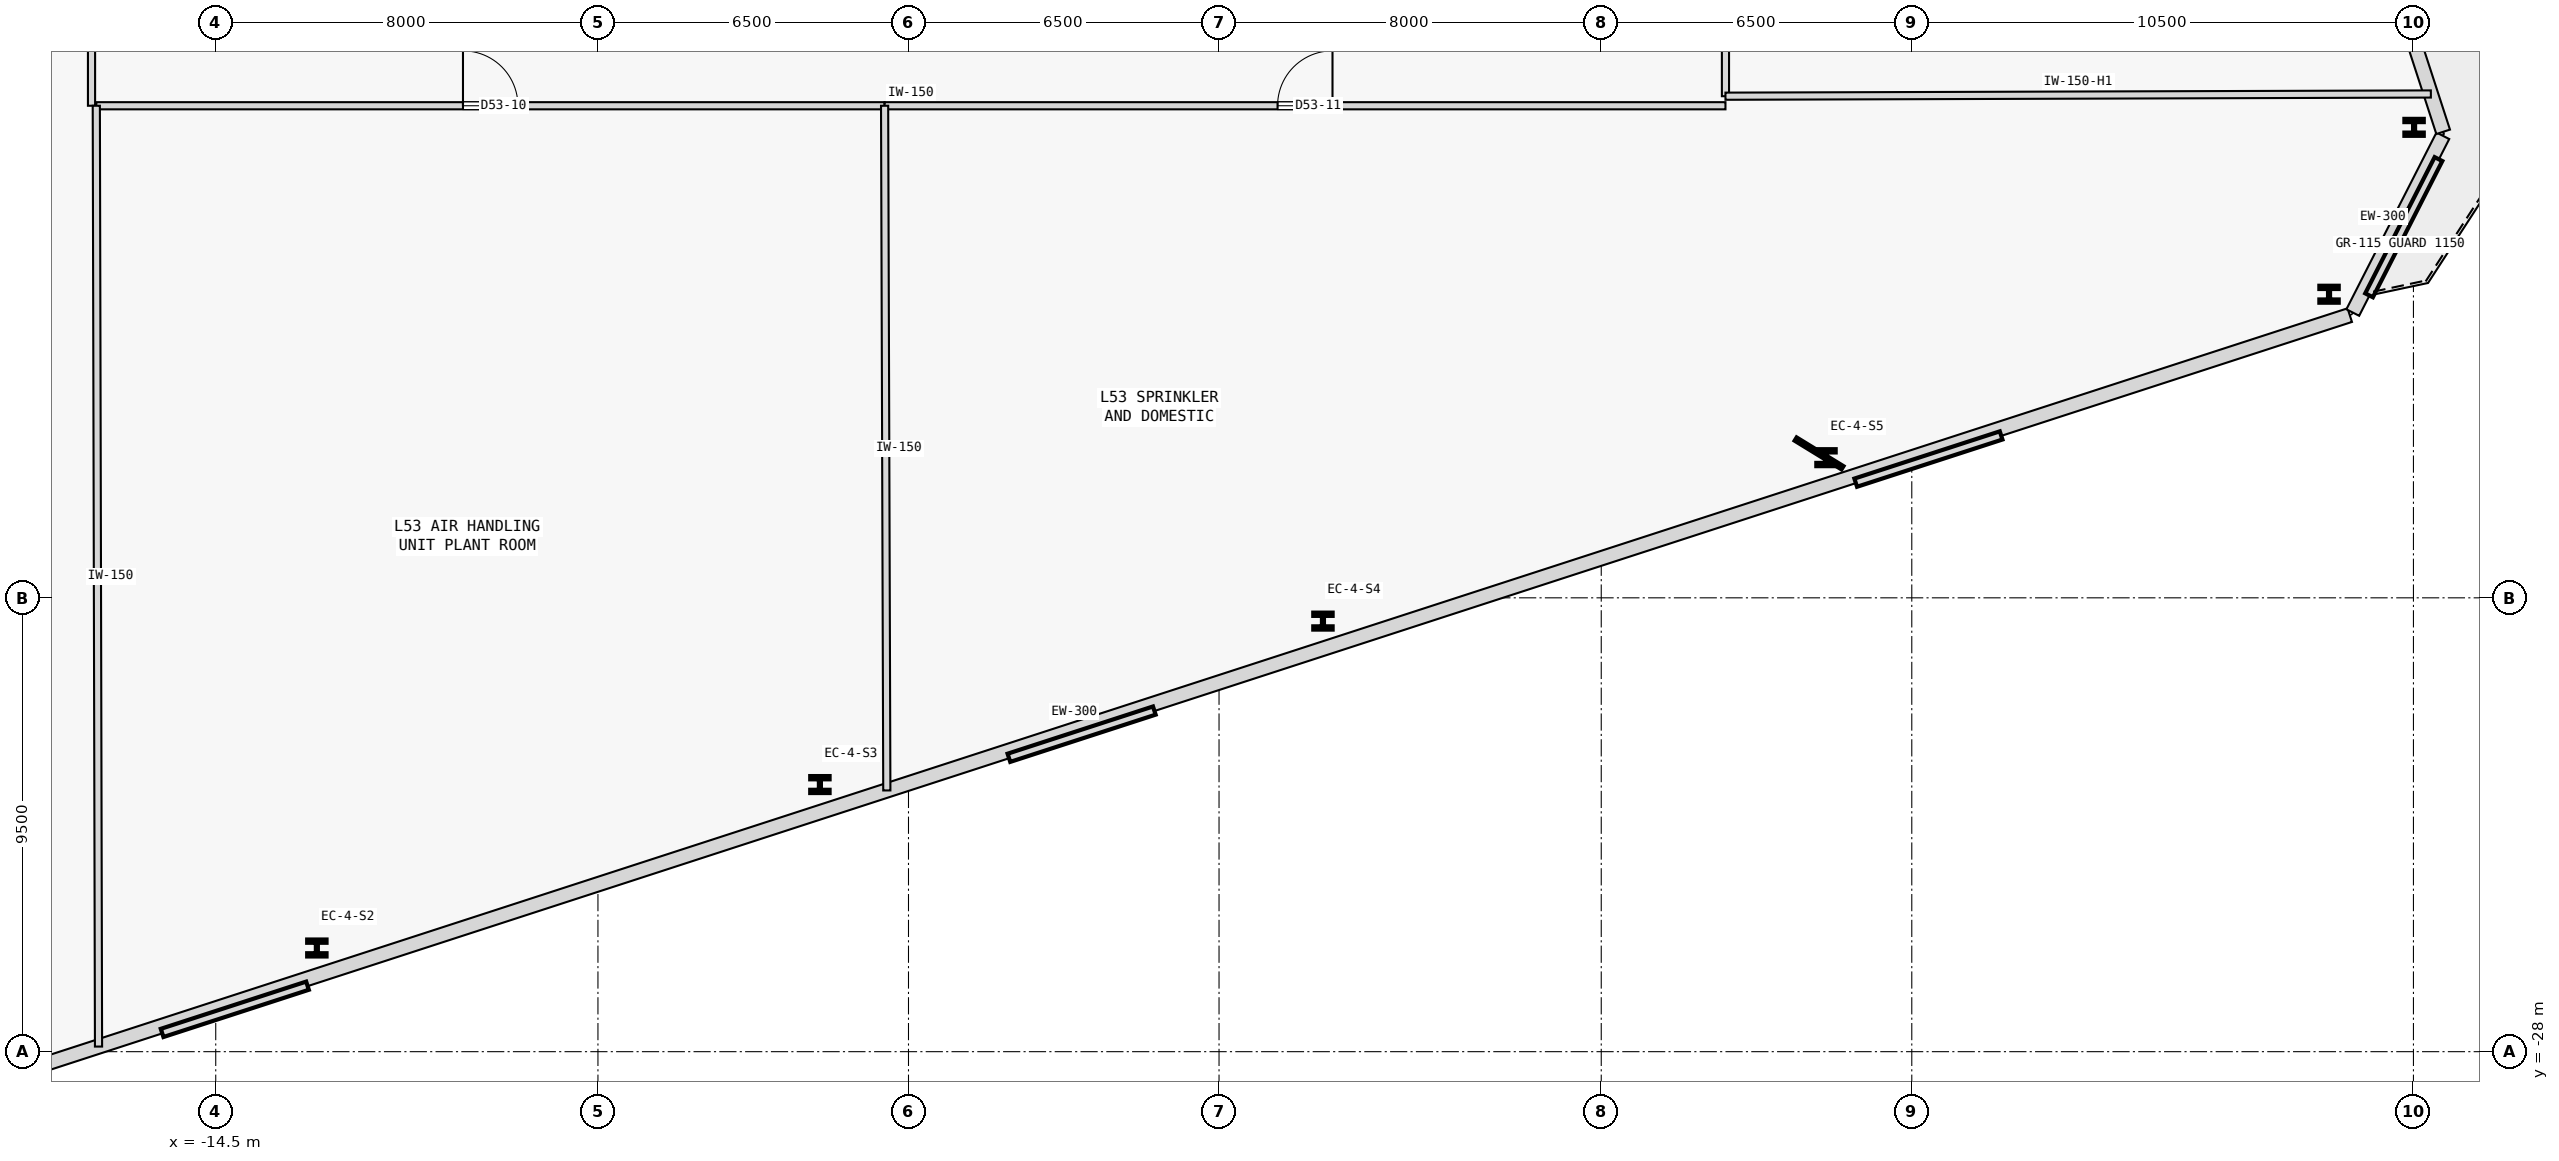
"""IFC4 building model, lengths in metres.
Left out: names, types, materials, properties, quantities, classifications, styles, units other than length and angle.
Written with IfcOpenShell. Run it as: python <this file> out.ifc"""

import sys

from ifc_helpers import new_model, si_unit, direction, frame, frame_2d, origin, origin_2d, place, context, subcontext, project, spatial, rectangle, i_section, extrude, element, fill, save


model = new_model("IFC4")
c1 = context("Model", 3, precision=1e-05, world=origin(), true_north=direction((0.0, 1.0)))
c2 = subcontext(c1, "Body", "Model", "MODEL_VIEW")
j1 = project(units=[si_unit("LENGTHUNIT", "METRE"), si_unit("PLANEANGLEUNIT", "RADIAN")], contexts=[c1])
p1 = place(None, origin())
s1 = spatial("IfcSite", under=j1, at=p1, CompositionType="ELEMENT")
p2 = place(p1, origin())
s2 = spatial("IfcBuilding", under=s1, at=p2, CompositionType="ELEMENT")
p3 = place(p2, frame((0.0, 0.0, 202.4)))
s3 = spatial("IfcBuildingStorey", under=s2, at=p3, CompositionType="ELEMENT", Elevation=202.4)
for number, where, z_axis, x_axis in (
    (1, (-12.384, -25.83, 0.0), (0.0, 0.0, 1.0), (1.0, 0.0, 0.0)),
    (2, (-1.854, -22.409, 0.0), (0.0, 0.0, 1.0), (1.0, 0.0, 0.0)),
    (3, (8.675, -18.988, 0.0), (0.0, 0.0, 1.0), (1.0, 0.0, 0.0)),
    (4, (19.204, -15.566, 0.0), (0.0, 0.0, 1.0), (1.0, 0.0, 0.0)),
    (5, (29.734, -12.145, 0.0), (0.0, 0.0, 1.0), (1.0, 0.0, 0.0)),
    (6, (31.513, -8.652, 0.0), (0.0, 0.0, 1.0), (1.0, 0.0, 0.0)),
):
    element("IfcColumn", number, at=place(p3, frame(where, z_axis=z_axis, x_axis=x_axis)), inside=s3, PredefinedType="COLUMN", context=c2, shape_type="SweptSolid", body=[
        extrude(i_section(OverallWidth=0.405, OverallDepth=0.355, WebThickness=0.042, FlangeThickness=0.068, FilletRadius=0.015, at=origin_2d()), origin(), (0.0, 0.0, 1.0), 4.4),
    ])
p4 = place(p3, frame((-23.006, -29.86, 0.0), z_axis=(0.0, 0.0, 1.0), x_axis=(0.951056336628, 0.309017547334, 0.0)))
e7 = element("IfcWall", 7, at=p4, inside=s3, PredefinedType="STANDARD", context=c2, shape_type="SweptSolid", body=[
    extrude(rectangle(XDim=55.91, YDim=0.3, at=frame_2d((27.955, 0.0))), origin(), (0.0, 0.0, 1.0), 4.15),
])
p5 = place(p3, frame((30.23, -12.529, 0.0), z_axis=(0.0, 0.0, 1.0), x_axis=(0.453950442261, 0.891026933359, 0.0)))
e8 = element("IfcWall", 8, at=p5, inside=s3, PredefinedType="STANDARD", context=c2, shape_type="SweptSolid", body=[
    extrude(rectangle(XDim=4.152, YDim=0.3, at=frame_2d((2.076, 0.0))), origin(), (0.0, 0.0, 1.0), 4.15),
])
p6 = place(p3, frame((32.122, -8.746, 0.0), z_axis=(0.0, 0.0, 1.0), x_axis=(-0.309017534148, 0.951056340912, 0.0)))
e9 = element("IfcWall", 9, at=p6, inside=s3, PredefinedType="STANDARD", context=c2, shape_type="SweptSolid", body=[
    extrude(rectangle(XDim=33.91, YDim=0.3, at=frame_2d((16.955, 0.0))), origin(), (0.0, 0.0, 1.0), 4.15),
])
p7 = place(p3, frame((-17.0, -8.2, 0.0), z_axis=(0.0, 0.0, 1.0), x_axis=(1.0, 0.0, 0.0)))
e10 = element("IfcWall", 10, at=p7, inside=s3, PredefinedType="PARTITIONING", context=c2, shape_type="SweptSolid", body=[
    extrude(rectangle(XDim=16.5, YDim=0.15, at=frame_2d((8.25, 0.0))), origin(), (0.0, 0.0, 1.0), 4.15),
])
p8 = place(p7, frame((7.675, 0.0, 0.0)))
e11 = element("IfcOpeningElement", 11, at=p8, cuts=e10, PredefinedType="OPENING", context=c2, shape_type="SweptSolid", body=[
    extrude(rectangle(XDim=1.15, YDim=2.15, at=frame_2d((0.575, 1.075))), frame((0.0, 0.085, 0.0), z_axis=(0.0, -1.0, 0.0), x_axis=(1.0, 0.0, 0.0)), (0.0, 0.0, 1.0), 0.17),
])
p9 = place(p3, frame((-0.5, -8.2, 0.0), z_axis=(0.0, 0.0, 1.0), x_axis=(1.0, 0.0, 0.0)))
e12 = element("IfcWall", 12, at=p9, inside=s3, PredefinedType="PARTITIONING", context=c2, shape_type="SweptSolid", body=[
    extrude(rectangle(XDim=17.6, YDim=0.15, at=frame_2d((8.8, 0.0))), origin(), (0.0, 0.0, 1.0), 4.15),
])
p10 = place(p9, frame((8.225, 0.0, 0.0)))
e13 = element("IfcOpeningElement", 13, at=p10, cuts=e12, PredefinedType="OPENING", context=c2, shape_type="SweptSolid", body=[
    extrude(rectangle(XDim=1.15, YDim=2.15, at=frame_2d((0.575, 1.075))), frame((0.0, 0.085, 0.0), z_axis=(0.0, -1.0, 0.0), x_axis=(1.0, 0.0, 0.0)), (0.0, 0.0, 1.0), 0.17),
])
p11 = place(p3, frame((-17.1, -8.2, 0.0), z_axis=(0.0, 0.0, 1.0), x_axis=(0.0, 1.0, 0.0)))
e14 = element("IfcWall", 14, at=p11, inside=s3, PredefinedType="PARTITIONING", context=c2, shape_type="SweptSolid", body=[
    extrude(rectangle(XDim=16.4, YDim=0.15, at=frame_2d((8.2, 0.0))), origin(), (0.0, 0.0, 1.0), 4.15),
])
p12 = place(p11, frame((5.165, 0.0, 0.0)))
e15 = element("IfcOpeningElement", 15, at=p12, cuts=e14, PredefinedType="OPENING", context=c2, shape_type="SweptSolid", body=[
    extrude(rectangle(XDim=1.15, YDim=2.15, at=frame_2d((0.575, 1.075))), frame((0.0, 0.085, 0.0), z_axis=(0.0, -1.0, 0.0), x_axis=(1.0, 0.0, 0.0)), (0.0, 0.0, 1.0), 0.17),
])
p13 = place(p3, frame((17.1, -8.0, 0.0), z_axis=(0.0, 0.0, 1.0), x_axis=(0.0, 1.0, 0.0)))
e16 = element("IfcWall", 16, at=p13, inside=s3, PredefinedType="PARTITIONING", context=c2, shape_type="SweptSolid", body=[
    extrude(rectangle(XDim=16.0, YDim=0.15, at=frame_2d((8.0, 0.0))), origin(), (0.0, 0.0, 1.0), 4.15),
])
p14 = place(p13, frame((5.025, 0.0, 0.0)))
e17 = element("IfcOpeningElement", 17, at=p14, cuts=e16, PredefinedType="OPENING", context=c2, shape_type="SweptSolid", body=[
    extrude(rectangle(XDim=1.15, YDim=2.15, at=frame_2d((0.575, 1.075))), frame((0.0, 0.085, 0.0), z_axis=(0.0, -1.0, 0.0), x_axis=(1.0, 0.0, 0.0)), (0.0, 0.0, 1.0), 0.17),
])
p15 = place(p3, frame((-0.454, -22.532, 0.0), z_axis=(0.0, 0.0, 1.0), x_axis=(-0.003236614906, 0.999994762148, 0.0)))
e18 = element("IfcWall", 18, at=p15, inside=s3, PredefinedType="PARTITIONING", context=c2, shape_type="SweptSolid", body=[
    extrude(rectangle(XDim=14.332, YDim=0.15, at=frame_2d((7.166, 0.0))), origin(), (0.0, 0.0, 1.0), 4.15),
])
p16 = place(p3, frame((-16.954, -27.893, 0.0), z_axis=(0.0, 0.0, 1.0), x_axis=(-0.002355472434, 0.999997225871, 0.0)))
e19 = element("IfcWall", 19, at=p16, inside=s3, PredefinedType="PARTITIONING", context=c2, shape_type="SweptSolid", body=[
    extrude(rectangle(XDim=19.693, YDim=0.15, at=frame_2d((9.847, 0.0))), origin(), (0.0, 0.0, 1.0), 4.15),
])
p17 = place(p3, frame((17.1, -8.0, 0.0), z_axis=(0.0, 0.0, 1.0), x_axis=(0.999995064765, 0.003141726673, 0.0)))
e20 = element("IfcWall", 20, at=p17, inside=s3, PredefinedType="PARTITIONING", context=c2, shape_type="SweptSolid", body=[
    extrude(rectangle(XDim=14.765, YDim=0.15, at=frame_2d((7.382, 0.0))), origin(), (0.0, 0.0, 1.0), 3.7),
])
p18 = place(p8, origin())
e21 = element("IfcDoor", 21, at=p18, inside=s3, OperationType="SINGLE_SWING_LEFT", PredefinedType="DOOR", context=c2, shape_type="SweptSolid", body=[
    extrude(rectangle(XDim=1.15, YDim=2.15, at=frame_2d((0.575, 1.075))), frame((0.0, 0.025, 0.0), z_axis=(0.0, -1.0, 0.0), x_axis=(1.0, 0.0, 0.0)), (0.0, 0.0, 1.0), 0.05),
])
fill(e11, e21)
p19 = place(p10, origin())
e22 = element("IfcDoor", 22, at=p19, inside=s3, OperationType="SINGLE_SWING_RIGHT", PredefinedType="DOOR", context=c2, shape_type="SweptSolid", body=[
    extrude(rectangle(XDim=1.15, YDim=2.15, at=frame_2d((0.575, 1.075))), frame((0.0, 0.025, 0.0), z_axis=(0.0, -1.0, 0.0), x_axis=(1.0, 0.0, 0.0)), (0.0, 0.0, 1.0), 0.05),
])
fill(e13, e22)
save(model, sys.argv[1])
